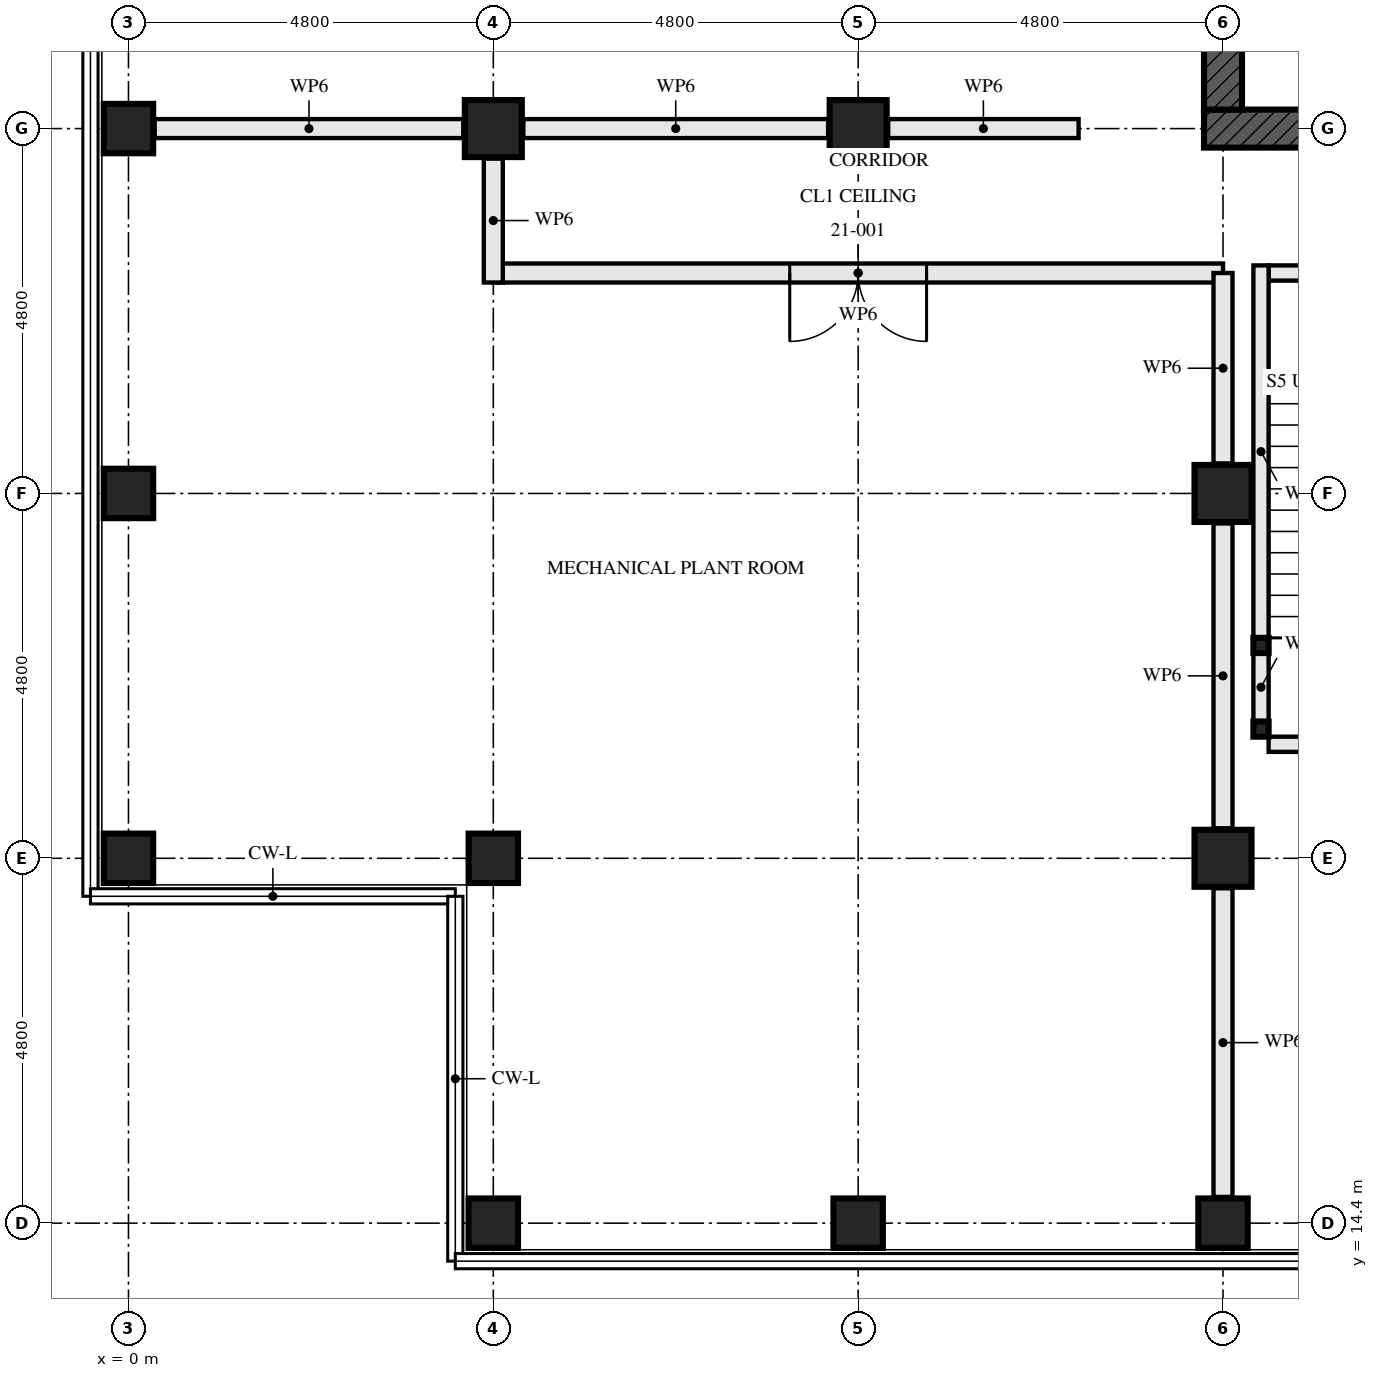
"""IFC4 building model, lengths in metres.
Left out: names, types, materials, properties, quantities, classifications, styles, units other than length and angle.
Written with IfcOpenShell. Run it as: python <this file> out.ifc"""

import sys

from ifc_helpers import new_model, si_unit, direction, frame, frame_2d, origin, origin_2d, place, context, subcontext, project, spatial, rectangle, hollow_rectangle, extrude, element, fill, save


model = new_model("IFC4")
c1 = context("Model", 3, precision=1e-05, world=origin(), true_north=direction((0.0, 1.0)))
c2 = subcontext(c1, "Body", "Model", "MODEL_VIEW")
j1 = project(units=[si_unit("LENGTHUNIT", "METRE"), si_unit("PLANEANGLEUNIT", "RADIAN")], contexts=[c1])
p1 = place(None, origin())
s1 = spatial("IfcSite", under=j1, at=p1, CompositionType="ELEMENT")
p2 = place(p1, origin())
s2 = spatial("IfcBuilding", under=s1, at=p2, CompositionType="ELEMENT")
p3 = place(p2, frame((0.0, 0.0, 79.5)))
s3 = spatial("IfcBuildingStorey", under=s2, at=p3, CompositionType="ELEMENT", Elevation=79.5)
for number, where, z_axis, x_axis in (
    (1, (0.0, 19.2, 0.0), (0.0, 0.0, 1.0), (0.0, 1.0, 0.0)),
    (2, (0.0, 24.0, 0.0), (0.0, 0.0, 1.0), (1.0, 0.0, 0.0)),
    (3, (0.0, 28.8, 0.0), (0.0, 0.0, 1.0), (0.0, 1.0, 0.0)),
    (4, (4.8, 14.4, 0.0), (0.0, 0.0, 1.0), (0.0, 1.0, 0.0)),
    (5, (4.8, 19.2, 0.0), (0.0, 0.0, 1.0), (0.0, 1.0, 0.0)),
):
    element("IfcColumn", number, at=place(p3, frame(where, z_axis=z_axis, x_axis=x_axis)), inside=s3, PredefinedType="COLUMN", context=c2, shape_type="SweptSolid", body=[
        extrude(hollow_rectangle(XDim=0.65, YDim=0.65, WallThickness=0.08, at=origin_2d()), origin(), (0.0, 0.0, 1.0), 4.33),
    ])
p4 = place(p3, frame((4.8, 28.8, 0.0), z_axis=(0.0, 0.0, 1.0), x_axis=(0.0, 1.0, 0.0)))
e6 = element("IfcColumn", 6, at=p4, inside=s3, PredefinedType="COLUMN", context=c2, shape_type="SweptSolid", body=[
    extrude(hollow_rectangle(XDim=0.75, YDim=0.75, WallThickness=0.08, at=origin_2d()), origin(), (0.0, 0.0, 1.0), 4.5),
])
p5 = place(p3, frame((9.6, 14.4, 0.0), z_axis=(0.0, 0.0, 1.0), x_axis=(0.0, 1.0, 0.0)))
e7 = element("IfcColumn", 7, at=p5, inside=s3, PredefinedType="COLUMN", context=c2, shape_type="SweptSolid", body=[
    extrude(hollow_rectangle(XDim=0.65, YDim=0.65, WallThickness=0.08, at=origin_2d()), origin(), (0.0, 0.0, 1.0), 4.33),
])
p6 = place(p3, frame((9.6, 28.8, 0.0), z_axis=(0.0, 0.0, 1.0), x_axis=(0.0, 1.0, 0.0)))
e8 = element("IfcColumn", 8, at=p6, inside=s3, PredefinedType="COLUMN", context=c2, shape_type="SweptSolid", body=[
    extrude(hollow_rectangle(XDim=0.75, YDim=0.75, WallThickness=0.08, at=origin_2d()), origin(), (0.0, 0.0, 1.0), 4.5),
])
p7 = place(p3, frame((14.4, 14.4, 0.0), z_axis=(0.0, 0.0, 1.0), x_axis=(0.0, 1.0, 0.0)))
e9 = element("IfcColumn", 9, at=p7, inside=s3, PredefinedType="COLUMN", context=c2, shape_type="SweptSolid", body=[
    extrude(hollow_rectangle(XDim=0.65, YDim=0.65, WallThickness=0.08, at=origin_2d()), origin(), (0.0, 0.0, 1.0), 4.33),
])
for number, where, z_axis, x_axis in (
    (10, (14.4, 19.2, 0.0), (0.0, 0.0, 1.0), (1.0, 0.0, 0.0)),
    (11, (14.4, 24.0, 0.0), (0.0, 0.0, 1.0), (1.0, 0.0, 0.0)),
):
    element("IfcColumn", number, at=place(p3, frame(where, z_axis=z_axis, x_axis=x_axis)), inside=s3, PredefinedType="COLUMN", context=c2, shape_type="SweptSolid", body=[
        extrude(hollow_rectangle(XDim=0.75, YDim=0.75, WallThickness=0.08, at=origin_2d()), origin(), (0.0, 0.0, 1.0), 4.5),
    ])
p8 = place(p3, frame((14.15, 28.8, -0.25), z_axis=(0.0, 0.0, 1.0), x_axis=(1.0, 0.0, 0.0)))
e12 = element("IfcWall", 12, at=p8, inside=s3, PredefinedType="SHEAR", context=c2, shape_type="SweptSolid", body=[
    extrude(rectangle(XDim=14.9, YDim=0.5, at=frame_2d((7.45, 0.0))), origin(), (0.0, 0.0, 1.0), 4.58),
])
p9 = place(p8, frame((6.85, 0.0, 0.25)))
e13 = element("IfcOpeningElement", 13, at=p9, cuts=e12, PredefinedType="OPENING", context=c2, shape_type="SweptSolid", body=[
    extrude(rectangle(XDim=1.2, YDim=2.1, at=frame_2d((0.6, 1.05))), frame((0.0, 0.26, 0.0), z_axis=(0.0, -1.0, 0.0), x_axis=(1.0, 0.0, 0.0)), (0.0, 0.0, 1.0), 0.521),
])
p10 = place(p3, frame((14.4, 42.95, -0.25), z_axis=(0.0, 0.0, 1.0), x_axis=(0.0, -1.0, 0.0)))
e14 = element("IfcWall", 14, at=p10, inside=s3, PredefinedType="SHEAR", context=c2, shape_type="SweptSolid", body=[
    extrude(rectangle(XDim=13.9, YDim=0.5, at=frame_2d((6.95, 0.0))), origin(), (0.0, 0.0, 1.0), 4.58),
])
p11 = place(p10, frame((6.35, 0.0, 0.25)))
e15 = element("IfcOpeningElement", 15, at=p11, cuts=e14, PredefinedType="OPENING", context=c2, shape_type="SweptSolid", body=[
    extrude(rectangle(XDim=1.2, YDim=2.1, at=frame_2d((0.6, 1.05))), frame((0.0, 0.26, 0.0), z_axis=(0.0, -1.0, 0.0), x_axis=(1.0, 0.0, 0.0)), (0.0, 0.0, 1.0), 0.521),
])
for number, where, z_axis, x_axis in (
    (16, (14.9, 20.9, 0.0), (0.0, 0.0, 1.0), (1.0, 0.0, 0.0)),
    (17, (14.9, 22.0, 0.0), (0.0, 0.0, 1.0), (1.0, 0.0, 0.0)),
):
    element("IfcColumn", number, at=place(p3, frame(where, z_axis=z_axis, x_axis=x_axis)), inside=s3, PredefinedType="COLUMN", context=c2, shape_type="SweptSolid", body=[
        extrude(hollow_rectangle(XDim=0.2, YDim=0.2, WallThickness=0.008, at=origin_2d()), origin(), (0.0, 0.0, 1.0), 4.33),
    ])
p12 = place(p3, frame((4.8, 26.9, 0.0), z_axis=(0.0, 0.0, 1.0), x_axis=(1.0, 0.0, 0.0)))
e18 = element("IfcWall", 18, at=p12, inside=s3, PredefinedType="SOLIDWALL", context=c2, shape_type="SweptSolid", body=[
    extrude(rectangle(XDim=9.6, YDim=0.25, at=frame_2d((4.8, 0.0))), origin(), (0.0, 0.0, 1.0), 4.33),
])
p13 = place(p12, frame((3.9, 0.0, 0.0)))
e19 = element("IfcOpeningElement", 19, at=p13, cuts=e18, PredefinedType="OPENING", context=c2, shape_type="SweptSolid", body=[
    extrude(rectangle(XDim=1.8, YDim=2.4, at=frame_2d((0.9, 1.2))), frame((0.0, 0.135, 0.0), z_axis=(0.0, -1.0, 0.0), x_axis=(1.0, 0.0, 0.0)), (0.0, 0.0, 1.0), 0.271),
])
p14 = place(p3, frame((4.8, 26.775, 0.0), z_axis=(0.0, 0.0, 1.0), x_axis=(0.0, 1.0, 0.0)))
e20 = element("IfcWall", 20, at=p14, inside=s3, PredefinedType="SOLIDWALL", context=c2, shape_type="SweptSolid", body=[
    extrude(rectangle(XDim=1.63, YDim=0.25, at=frame_2d((0.815, 0.0))), origin(), (0.0, 0.0, 1.0), 4.33),
])
p15 = place(p3, frame((14.9, 21.0, 0.0), z_axis=(0.0, 0.0, 1.0), x_axis=(0.0, 1.0, 0.0)))
e21 = element("IfcWall", 21, at=p15, inside=s3, PredefinedType="SOLIDWALL", context=c2, shape_type="SweptSolid", body=[
    extrude(rectangle(XDim=0.9, YDim=0.2, at=frame_2d((0.45, 0.0))), origin(), (0.0, 0.0, 1.0), 3.99),
])
p16 = place(p3, frame((14.9, 22.1, 0.0), z_axis=(0.0, 0.0, 1.0), x_axis=(0.0, 1.0, 0.0)))
e22 = element("IfcWall", 22, at=p16, inside=s3, PredefinedType="SOLIDWALL", context=c2, shape_type="SweptSolid", body=[
    extrude(rectangle(XDim=4.9, YDim=0.2, at=frame_2d((2.45, 0.0))), origin(), (0.0, 0.0, 1.0), 3.99),
])
p17 = place(p3, frame((15.0, 20.7, 0.0), z_axis=(0.0, 0.0, 1.0), x_axis=(1.0, 0.0, 0.0)))
e23 = element("IfcWall", 23, at=p17, inside=s3, PredefinedType="SOLIDWALL", context=c2, shape_type="SweptSolid", body=[
    extrude(rectangle(XDim=2.6, YDim=0.2, at=frame_2d((1.3, 0.0))), origin(), (0.0, 0.0, 1.0), 4.33),
])
p18 = place(p3, frame((15.0, 26.9, 0.0), z_axis=(0.0, 0.0, 1.0), x_axis=(1.0, 0.0, 0.0)))
e24 = element("IfcWall", 24, at=p18, inside=s3, PredefinedType="SOLIDWALL", context=c2, shape_type="SweptSolid", body=[
    extrude(rectangle(XDim=2.6, YDim=0.2, at=frame_2d((1.3, 0.0))), origin(), (0.0, 0.0, 1.0), 4.33),
])
p19 = place(p18, frame((0.8, 0.0, 0.0)))
e25 = element("IfcOpeningElement", 25, at=p19, cuts=e24, PredefinedType="OPENING", context=c2, shape_type="SweptSolid", body=[
    extrude(rectangle(XDim=1.0, YDim=2.1, at=frame_2d((0.5, 1.05))), frame((0.0, 0.111, 0.0), z_axis=(0.0, -1.0, 0.0), x_axis=(1.0, 0.0, 0.0)), (0.0, 0.0, 1.0), 0.221),
])
p20 = place(p3, frame((12.5, 28.8, 0.0), z_axis=(0.0, 0.0, 1.0), x_axis=(-1.0, 0.0, 0.0)))
e26 = element("IfcWall", 26, at=p20, inside=s3, PredefinedType="SOLIDWALL", context=c2, shape_type="SweptSolid", body=[
    extrude(rectangle(XDim=2.505, YDim=0.25, at=frame_2d((1.252, 0.0))), origin(), (0.0, 0.0, 1.0), 3.12),
])
p21 = place(p3, frame((9.205, 28.8, 0.0), z_axis=(0.0, 0.0, 1.0), x_axis=(-1.0, 0.0, 0.0)))
e27 = element("IfcWall", 27, at=p21, inside=s3, PredefinedType="SOLIDWALL", context=c2, shape_type="SweptSolid", body=[
    extrude(rectangle(XDim=4.01, YDim=0.25, at=frame_2d((2.005, 0.0))), origin(), (0.0, 0.0, 1.0), 3.12),
])
p22 = place(p3, frame((4.405, 28.8, 0.0), z_axis=(0.0, 0.0, 1.0), x_axis=(-1.0, 0.0, 0.0)))
e28 = element("IfcWall", 28, at=p22, inside=s3, PredefinedType="SOLIDWALL", context=c2, shape_type="SweptSolid", body=[
    extrude(rectangle(XDim=4.06, YDim=0.25, at=frame_2d((2.03, 0.0))), origin(), (0.0, 0.0, 1.0), 3.12),
])
p23 = place(p3, frame((14.4, 14.745, 0.0), z_axis=(0.0, 0.0, 1.0), x_axis=(0.0, 1.0, 0.0)))
e29 = element("IfcWall", 29, at=p23, inside=s3, PredefinedType="SOLIDWALL", context=c2, shape_type="SweptSolid", body=[
    extrude(rectangle(XDim=4.06, YDim=0.25, at=frame_2d((2.03, 0.0))), origin(), (0.0, 0.0, 1.0), 2.82),
])
p24 = place(p3, frame((14.4, 19.595, 0.0), z_axis=(0.0, 0.0, 1.0), x_axis=(0.0, 1.0, 0.0)))
e30 = element("IfcWall", 30, at=p24, inside=s3, PredefinedType="SOLIDWALL", context=c2, shape_type="SweptSolid", body=[
    extrude(rectangle(XDim=4.01, YDim=0.25, at=frame_2d((2.005, 0.0))), origin(), (0.0, 0.0, 1.0), 2.82),
])
p25 = place(p3, frame((14.4, 24.395, 0.0), z_axis=(0.0, 0.0, 1.0), x_axis=(0.0, 1.0, 0.0)))
e31 = element("IfcWall", 31, at=p25, inside=s3, PredefinedType="SOLIDWALL", context=c2, shape_type="SweptSolid", body=[
    extrude(rectangle(XDim=2.505, YDim=0.25, at=frame_2d((1.252, 0.0))), origin(), (0.0, 0.0, 1.0), 2.82),
])
p26 = place(p13, frame((1.8, 0.0, 0.0), z_axis=(0.0, 0.0, 1.0), x_axis=(-1.0, 0.0, 0.0)))
e32 = element("IfcDoor", 32, at=p26, inside=s3, OperationType="DOUBLE_DOOR_SINGLE_SWING", PredefinedType="DOOR", context=c2, shape_type="SweptSolid", body=[
    extrude(rectangle(XDim=1.8, YDim=2.4, at=frame_2d((0.9, 1.2))), frame((0.0, 0.032, 0.0), z_axis=(0.0, -1.0, 0.0), x_axis=(1.0, 0.0, 0.0)), (0.0, 0.0, 1.0), 0.064),
])
fill(e19, e32)
save(model, sys.argv[1])
